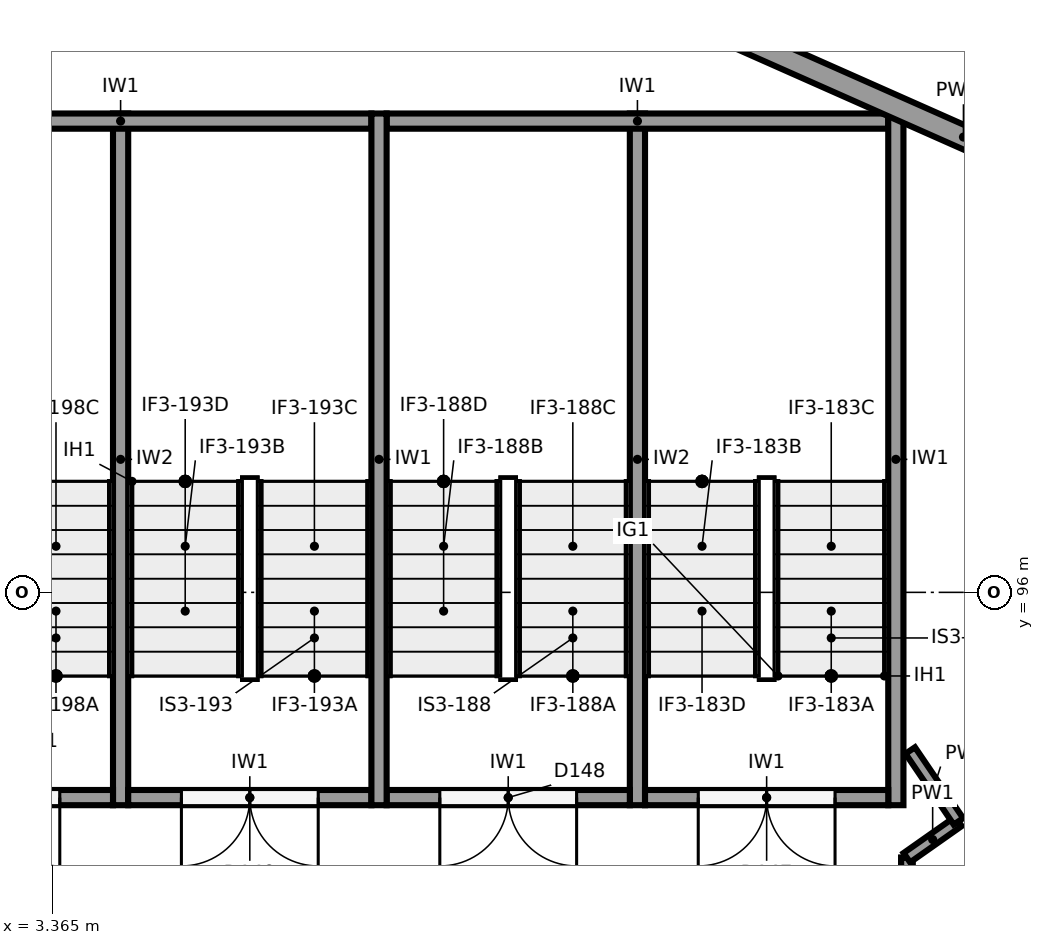
"""IFC4 building model, lengths in metres.
Left out: names, types, materials, properties, quantities, classifications, styles, units other than length and angle.
Written with IfcOpenShell. Run it as: python <this file> out.ifc"""

import sys

from ifc_helpers import new_model, si_unit, direction, frame, frame_2d, origin, place, context, subcontext, project, spatial, rectangle, extrude, element, fill, save


model = new_model("IFC4")
c1 = context("Model", 3, precision=1e-05, world=origin(), true_north=direction((0.0, 1.0)))
c2 = subcontext(c1, "Body", "Model", "MODEL_VIEW")
j1 = project(units=[si_unit("LENGTHUNIT", "METRE"), si_unit("PLANEANGLEUNIT", "RADIAN")], contexts=[c1])
p1 = place(None, origin())
s1 = spatial("IfcSite", under=j1, at=p1, CompositionType="ELEMENT")
p2 = place(p1, origin())
s2 = spatial("IfcBuilding", under=s1, at=p2, CompositionType="ELEMENT")
p3 = place(p2, frame((0.0, 0.0, 6.5)))
s3 = spatial("IfcBuildingStorey", under=s2, at=p3, CompositionType="ELEMENT", Elevation=6.5)
p4 = place(p3, frame((8.123, 105.198, 0.0), z_axis=(0.0, 0.0, 1.0), x_axis=(0.914138897099, -0.405401130748, 0.0)))
e1 = element("IfcWall", 1, at=p4, inside=s3, PredefinedType="SOLIDWALL", context=c2, shape_type="SweptSolid", body=[
    extrude(rectangle(XDim=15.824, YDim=0.3, at=frame_2d((7.912, 0.0))), origin(), (0.0, 0.0, 1.0), 3.85),
])
p5 = place(p4, frame((11.574, 0.0, 0.0)))
e2 = element("IfcOpeningElement", 2, at=p5, cuts=e1, PredefinedType="OPENING", context=c2, shape_type="SweptSolid", body=[
    extrude(rectangle(XDim=1.8, YDim=2.4, at=frame_2d((0.9, 1.2))), frame((0.0, 0.16, 0.0), z_axis=(0.0, -1.0, 0.0), x_axis=(1.0, 0.0, 0.0)), (0.0, 0.0, 1.0), 0.32),
])
p6 = place(p3, frame((-7.256, 98.782, 0.0), z_axis=(0.0, 0.0, 1.0), x_axis=(0.914136361455, 0.405406848322, 0.0)))
e3 = element("IfcWall", 3, at=p6, inside=s3, PredefinedType="SOLIDWALL", context=c2, shape_type="SweptSolid", body=[
    extrude(rectangle(XDim=15.824, YDim=0.35, at=frame_2d((7.912, 0.0))), origin(), (0.0, 0.0, 1.0), 3.85),
])
for number, where, z_axis, x_axis in (
    (4, (14.467, 102.3, 0.0), (0.0, 0.0, 1.0), (0.0, -1.0, 0.0)),
    (5, (7.667, 102.3, 0.0), (0.0, 0.0, 1.0), (0.0, -1.0, 0.0)),
):
    element("IfcWall", number, at=place(p3, frame(where, z_axis=z_axis, x_axis=x_axis)), inside=s3, PredefinedType="SHEAR", context=c2, shape_type="SweptSolid", body=[
        extrude(rectangle(XDim=9.1, YDim=0.2, at=frame_2d((4.55, 0.0))), origin(), (0.0, 0.0, 1.0), 5.15),
    ])
p7 = place(p3, frame((14.367, 102.2, 0.0), z_axis=(0.0, 0.0, 1.0), x_axis=(-1.0, 0.0, 0.0)))
e6 = element("IfcWall", 6, at=p7, inside=s3, PredefinedType="SHEAR", context=c2, shape_type="SweptSolid", body=[
    extrude(rectangle(XDim=6.6, YDim=0.2, at=frame_2d((3.3, 0.0))), origin(), (0.0, 0.0, 1.0), 5.15),
])
p8 = place(p3, frame((7.567, 102.2, 0.0), z_axis=(0.0, 0.0, 1.0), x_axis=(-1.0, 0.0, 0.0)))
e7 = element("IfcWall", 7, at=p8, inside=s3, PredefinedType="SHEAR", context=c2, shape_type="SweptSolid", body=[
    extrude(rectangle(XDim=6.6, YDim=0.2, at=frame_2d((3.3, 0.0))), origin(), (0.0, 0.0, 1.0), 5.15),
])
for number, where, z_axis, x_axis in (
    (8, (11.067, 102.3, 0.0), (0.0, 0.0, 1.0), (0.0, -1.0, 0.0)),
    (9, (4.267, 102.3, 0.0), (0.0, 0.0, 1.0), (0.0, -1.0, 0.0)),
):
    element("IfcWall", number, at=place(p3, frame(where, z_axis=z_axis, x_axis=x_axis)), inside=s3, PredefinedType="SHEAR", context=c2, shape_type="SweptSolid", body=[
        extrude(rectangle(XDim=9.1, YDim=0.2, at=frame_2d((4.55, 0.0))), origin(), (0.0, 0.0, 1.0), 5.15),
    ])
p9 = place(p3, frame((14.367, 93.3, 0.0), z_axis=(0.0, 0.0, 1.0), x_axis=(-1.0, 0.0, 0.0)))
e10 = element("IfcWall", 10, at=p9, inside=s3, PredefinedType="SHEAR", context=c2, shape_type="SweptSolid", body=[
    extrude(rectangle(XDim=3.2, YDim=0.2, at=frame_2d((1.6, 0.0))), origin(), (0.0, 0.0, 1.0), 5.15),
])
p10 = place(p9, frame((0.7, 0.0, 0.0)))
e11 = element("IfcOpeningElement", 11, at=p10, cuts=e10, PredefinedType="OPENING", context=c2, shape_type="SweptSolid", body=[
    extrude(rectangle(XDim=1.8, YDim=2.1, at=frame_2d((0.9, 1.05))), frame((0.0, 0.11, 0.0), z_axis=(0.0, -1.0, 0.0), x_axis=(1.0, 0.0, 0.0)), (0.0, 0.0, 1.0), 0.22),
])
p11 = place(p3, frame((10.967, 93.3, 0.0), z_axis=(0.0, 0.0, 1.0), x_axis=(-1.0, 0.0, 0.0)))
e12 = element("IfcWall", 12, at=p11, inside=s3, PredefinedType="SHEAR", context=c2, shape_type="SweptSolid", body=[
    extrude(rectangle(XDim=3.2, YDim=0.2, at=frame_2d((1.6, 0.0))), origin(), (0.0, 0.0, 1.0), 5.15),
])
p12 = place(p11, frame((0.7, 0.0, 0.0)))
e13 = element("IfcOpeningElement", 13, at=p12, cuts=e12, PredefinedType="OPENING", context=c2, shape_type="SweptSolid", body=[
    extrude(rectangle(XDim=1.8, YDim=2.1, at=frame_2d((0.9, 1.05))), frame((0.0, 0.11, 0.0), z_axis=(0.0, -1.0, 0.0), x_axis=(1.0, 0.0, 0.0)), (0.0, 0.0, 1.0), 0.22),
])
p13 = place(p3, frame((7.567, 93.3, 0.0), z_axis=(0.0, 0.0, 1.0), x_axis=(-1.0, 0.0, 0.0)))
e14 = element("IfcWall", 14, at=p13, inside=s3, PredefinedType="SHEAR", context=c2, shape_type="SweptSolid", body=[
    extrude(rectangle(XDim=3.2, YDim=0.2, at=frame_2d((1.6, 0.0))), origin(), (0.0, 0.0, 1.0), 5.15),
])
p14 = place(p13, frame((0.7, 0.0, 0.0)))
e15 = element("IfcOpeningElement", 15, at=p14, cuts=e14, PredefinedType="OPENING", context=c2, shape_type="SweptSolid", body=[
    extrude(rectangle(XDim=1.8, YDim=2.1, at=frame_2d((0.9, 1.05))), frame((0.0, 0.11, 0.0), z_axis=(0.0, -1.0, 0.0), x_axis=(1.0, 0.0, 0.0)), (0.0, 0.0, 1.0), 0.22),
])
p15 = place(p3, frame((4.167, 93.3, 0.0), z_axis=(0.0, 0.0, 1.0), x_axis=(-1.0, 0.0, 0.0)))
e16 = element("IfcWall", 16, at=p15, inside=s3, PredefinedType="SHEAR", context=c2, shape_type="SweptSolid", body=[
    extrude(rectangle(XDim=3.2, YDim=0.2, at=frame_2d((1.6, 0.0))), origin(), (0.0, 0.0, 1.0), 5.15),
])
p16 = place(p15, frame((0.7, 0.0, 0.0)))
e17 = element("IfcOpeningElement", 17, at=p16, cuts=e16, PredefinedType="OPENING", context=c2, shape_type="SweptSolid", body=[
    extrude(rectangle(XDim=1.8, YDim=2.1, at=frame_2d((0.9, 1.05))), frame((0.0, 0.11, 0.0), z_axis=(0.0, -1.0, 0.0), x_axis=(1.0, 0.0, 0.0)), (0.0, 0.0, 1.0), 0.22),
])
p17 = place(p3, frame((14.612, 88.088, 0.0), z_axis=(0.0, 0.0, 1.0), x_axis=(0.0, 1.0, 0.0)))
e18 = element("IfcWall", 18, at=p17, inside=s3, PredefinedType="PARTITIONING", context=c2, shape_type="SweptSolid", body=[
    extrude(rectangle(XDim=4.422, YDim=0.15, at=frame_2d((2.211, 0.0))), origin(), (0.0, 0.0, 1.0), 3.85),
])
p18 = place(p17, frame((0.95, 0.0, 0.0)))
e19 = element("IfcOpeningElement", 19, at=p18, cuts=e18, PredefinedType="OPENING", context=c2, shape_type="SweptSolid", body=[
    extrude(rectangle(XDim=1.8, YDim=2.1, at=frame_2d((0.9, 1.05))), frame((0.0, 0.085, 0.0), z_axis=(0.0, -1.0, 0.0), x_axis=(1.0, 0.0, 0.0)), (0.0, 0.0, 1.0), 0.17),
])
p19 = place(p3, frame((14.612, 90.888, 3.85), z_axis=(0.0, 0.0, 1.0), x_axis=(0.0, 1.0, 0.0)))
e20 = element("IfcWall", 20, at=p19, inside=s3, PredefinedType="PARTITIONING", context=c2, shape_type="SweptSolid", body=[
    extrude(rectangle(XDim=1.622, YDim=0.15, at=frame_2d((0.811, 0.0))), origin(), (0.0, 0.0, 1.0), 1.3),
])
p20 = place(p3, frame((14.612, 92.509, 0.0), z_axis=(0.0, 0.0, 1.0), x_axis=(0.81774999294, 0.575573582652, 0.0)))
e21 = element("IfcWall", 21, at=p20, inside=s3, PredefinedType="PARTITIONING", context=c2, shape_type="SweptSolid", body=[
    extrude(rectangle(XDim=0.83, YDim=0.15, at=frame_2d((0.415, 0.0))), origin(), (0.0, 0.0, 1.0), 5.15),
])
p21 = place(p3, frame((15.29, 92.987, 0.0), z_axis=(0.0, 0.0, 1.0), x_axis=(-0.562120553728, 0.827055308354, 0.0)))
e22 = element("IfcWall", 22, at=p21, inside=s3, PredefinedType="PARTITIONING", context=c2, shape_type="SweptSolid", body=[
    extrude(rectangle(XDim=1.128, YDim=0.15, at=frame_2d((0.564, 0.0))), origin(), (0.0, 0.0, 1.0), 5.15),
])
p22 = place(p10, origin())
e23 = element("IfcDoor", 23, at=p22, inside=s3, OperationType="DOUBLE_DOOR_SINGLE_SWING", PredefinedType="DOOR", context=c2, shape_type="SweptSolid", body=[
    extrude(rectangle(XDim=1.8, YDim=2.1, at=frame_2d((0.9, 1.05))), frame((0.0, 0.025, 0.0), z_axis=(0.0, -1.0, 0.0), x_axis=(1.0, 0.0, 0.0)), (0.0, 0.0, 1.0), 0.05),
])
fill(e11, e23)
p23 = place(p12, origin())
e24 = element("IfcDoor", 24, at=p23, inside=s3, OperationType="DOUBLE_DOOR_SINGLE_SWING", PredefinedType="DOOR", context=c2, shape_type="SweptSolid", body=[
    extrude(rectangle(XDim=1.8, YDim=2.1, at=frame_2d((0.9, 1.05))), frame((0.0, 0.025, 0.0), z_axis=(0.0, -1.0, 0.0), x_axis=(1.0, 0.0, 0.0)), (0.0, 0.0, 1.0), 0.05),
])
fill(e13, e24)
p24 = place(p14, origin())
e25 = element("IfcDoor", 25, at=p24, inside=s3, OperationType="DOUBLE_DOOR_SINGLE_SWING", PredefinedType="DOOR", context=c2, shape_type="SweptSolid", body=[
    extrude(rectangle(XDim=1.8, YDim=2.1, at=frame_2d((0.9, 1.05))), frame((0.0, 0.025, 0.0), z_axis=(0.0, -1.0, 0.0), x_axis=(1.0, 0.0, 0.0)), (0.0, 0.0, 1.0), 0.05),
])
fill(e15, e25)
p25 = place(p16, origin())
e26 = element("IfcDoor", 26, at=p25, inside=s3, OperationType="DOUBLE_DOOR_SINGLE_SWING", PredefinedType="DOOR", context=c2, shape_type="SweptSolid", body=[
    extrude(rectangle(XDim=1.8, YDim=2.1, at=frame_2d((0.9, 1.05))), frame((0.0, 0.025, 0.0), z_axis=(0.0, -1.0, 0.0), x_axis=(1.0, 0.0, 0.0)), (0.0, 0.0, 1.0), 0.05),
])
fill(e17, e26)
save(model, sys.argv[1])
